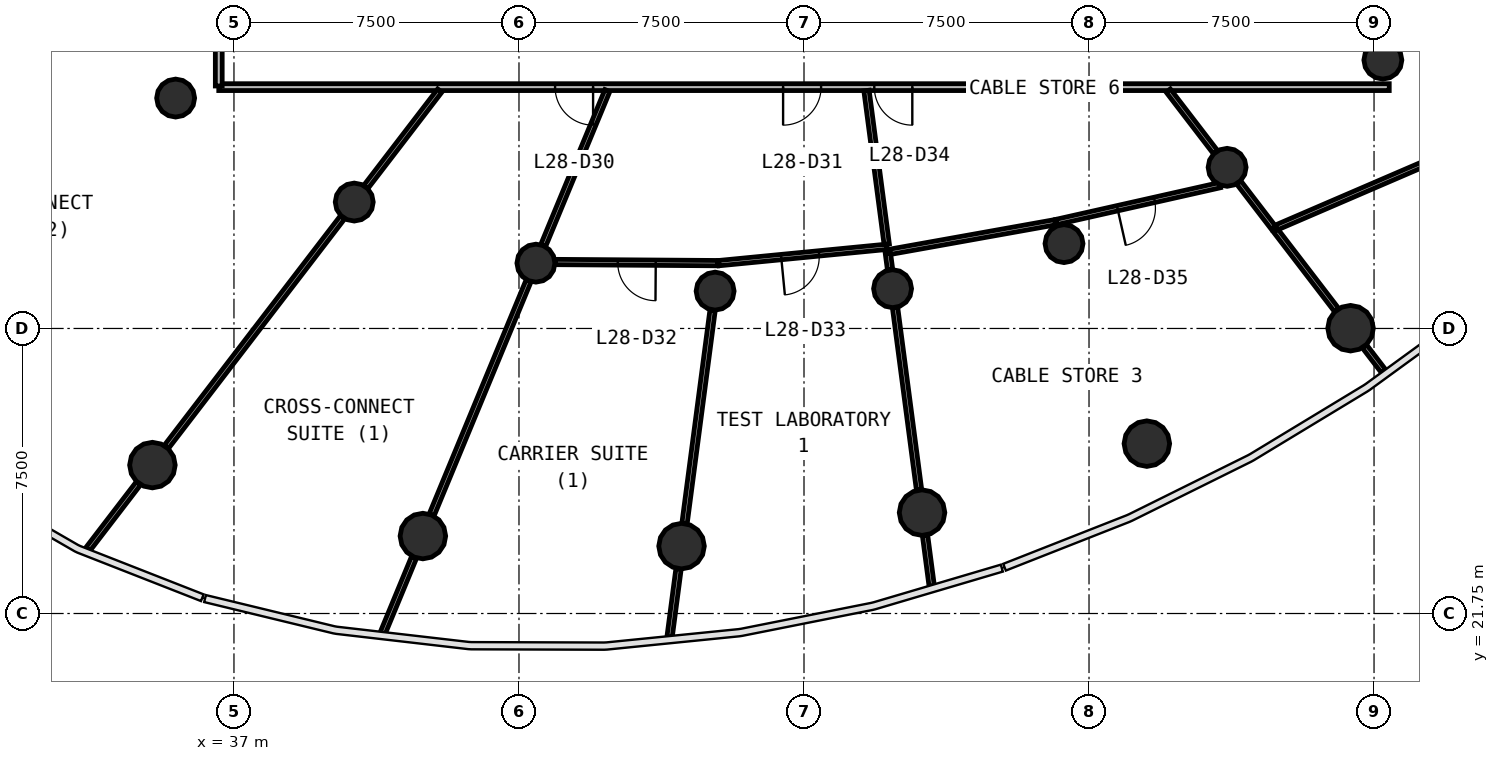
"""IFC4 building model, lengths in metres.
Left out: names, types, materials, properties, quantities, classifications, styles, units other than length and angle.
Written with IfcOpenShell. Run it as: python <this file> out.ifc"""

import sys

from ifc_helpers import new_model, si_unit, direction, frame, frame_2d, origin, origin_2d, place, context, subcontext, project, spatial, rectangle, circle, extrude, source, transform, mapped, element, fill, save


model = new_model("IFC4")
c1 = context("Model", 3, precision=1e-05, world=origin(), true_north=direction((0.0, 1.0)))
c2 = subcontext(c1, "Body", "Model", "MODEL_VIEW")
j1 = project(units=[si_unit("LENGTHUNIT", "METRE"), si_unit("PLANEANGLEUNIT", "RADIAN")], contexts=[c1])
p1 = place(None, origin())
s1 = spatial("IfcSite", under=j1, at=p1, CompositionType="ELEMENT")
p2 = place(p1, origin())
s2 = spatial("IfcBuilding", under=s1, at=p2, CompositionType="ELEMENT")
p3 = place(p2, frame((0.0, 0.0, 120.8)))
s3 = spatial("IfcBuildingStorey", under=s2, at=p3, CompositionType="ELEMENT", Elevation=120.8)
m1 = source(origin(), c2, "Body", "SweptSolid", [
    extrude(circle(Radius=0.6, at=origin_2d()), origin(), (0.0, 0.0, 1.0), 4.1),
])
for number, where, z_axis, x_axis in (
    (1, (34.854, 25.655, 0.0), (0.0, 0.0, 1.0), (1.0, 0.0, 0.0)),
    (2, (41.971, 23.788, 0.0), (0.0, 0.0, 1.0), (1.0, 0.0, 0.0)),
    (3, (48.778, 23.523, 0.0), (0.0, 0.0, 1.0), (1.0, 0.0, 0.0)),
    (4, (55.106, 24.405, 0.0), (0.0, 0.0, 1.0), (1.0, 0.0, 0.0)),
    (5, (61.022, 26.219, 0.0), (0.0, 0.0, 1.0), (1.0, 0.0, 0.0)),
    (6, (66.382, 29.257, 0.0), (0.0, 0.0, 1.0), (1.0, 0.0, 0.0)),
):
    element("IfcColumn", number, at=place(p3, frame(where, z_axis=z_axis, x_axis=x_axis)), inside=s3, PredefinedType="COLUMN", context=c2, shape_type="MappedRepresentation", body=[
        mapped(m1, transform((0.0, 0.0, 0.0), scale=1.0)),
    ])
m2 = source(origin(), c2, "Body", "SweptSolid", [
    extrude(circle(Radius=0.5, at=origin_2d()), origin(), (0.0, 0.0, 1.0), 4.1),
])
for number, where, z_axis, x_axis in (
    (7, (35.465, 35.312, 0.0), (0.0, 0.0, 1.0), (1.0, 0.0, 0.0)),
    (8, (40.165, 32.576, 0.0), (0.0, 0.0, 1.0), (1.0, 0.0, 0.0)),
    (9, (44.945, 30.969, 0.0), (0.0, 0.0, 1.0), (1.0, 0.0, 0.0)),
    (10, (49.661, 30.233, 0.0), (0.0, 0.0, 1.0), (1.0, 0.0, 0.0)),
    (11, (54.331, 30.297, 0.0), (0.0, 0.0, 1.0), (1.0, 0.0, 0.0)),
    (12, (58.842, 31.482, 0.0), (0.0, 0.0, 1.0), (1.0, 0.0, 0.0)),
    (13, (63.134, 33.49, 0.0), (0.0, 0.0, 1.0), (1.0, 0.0, 0.0)),
    (14, (67.232, 36.312, 0.0), (0.0, 0.0, 1.0), (1.0, 0.0, 0.0)),
):
    element("IfcColumn", number, at=place(p3, frame(where, z_axis=z_axis, x_axis=x_axis)), inside=s3, PredefinedType="COLUMN", context=c2, shape_type="MappedRepresentation", body=[
        mapped(m2, transform((0.0, 0.0, 0.0), scale=1.0)),
    ])
p4 = place(p3, frame((67.4, 35.6, 0.0), z_axis=(0.0, 0.0, 1.0), x_axis=(-1.0, 0.0, 0.0)))
e15 = element("IfcWall", 15, at=p4, inside=s3, PredefinedType="PARTITIONING", context=c2, shape_type="SweptSolid", body=[
    extrude(rectangle(XDim=30.8, YDim=0.18, at=frame_2d((15.4, 0.0))), origin(), (0.0, 0.0, 1.0), 2.9),
])
p5 = place(p4, frame((20.95, 0.0, 0.0)))
e16 = element("IfcOpeningElement", 16, at=p5, cuts=e15, PredefinedType="OPENING", context=c2, shape_type="SweptSolid", body=[
    extrude(rectangle(XDim=1.0, YDim=2.1, at=frame_2d((0.5, 1.05))), frame((0.0, 0.1, 0.0), z_axis=(0.0, -1.0, 0.0), x_axis=(1.0, 0.0, 0.0)), (0.0, 0.0, 1.0), 0.2),
])
p6 = place(p4, frame((14.95, 0.0, 0.0)))
e17 = element("IfcOpeningElement", 17, at=p6, cuts=e15, PredefinedType="OPENING", context=c2, shape_type="SweptSolid", body=[
    extrude(rectangle(XDim=1.0, YDim=2.1, at=frame_2d((0.5, 1.05))), frame((0.0, 0.1, 0.0), z_axis=(0.0, -1.0, 0.0), x_axis=(1.0, 0.0, 0.0)), (0.0, 0.0, 1.0), 0.2),
])
p7 = place(p4, frame((12.55, 0.0, 0.0)))
e18 = element("IfcOpeningElement", 18, at=p7, cuts=e15, PredefinedType="OPENING", context=c2, shape_type="SweptSolid", body=[
    extrude(rectangle(XDim=1.0, YDim=2.1, at=frame_2d((0.5, 1.05))), frame((0.0, 0.1, 0.0), z_axis=(0.0, -1.0, 0.0), x_axis=(1.0, 0.0, 0.0)), (0.0, 0.0, 1.0), 0.2),
])
p8 = place(p3, frame((36.6, 35.63, 0.0), z_axis=(0.0, 0.0, 1.0), x_axis=(0.0, 1.0, 0.0)))
e19 = element("IfcWall", 19, at=p8, inside=s3, PredefinedType="PARTITIONING", context=c2, shape_type="SweptSolid", body=[
    extrude(rectangle(XDim=23.583, YDim=0.18, at=frame_2d((11.791, 0.0))), origin(), (0.0, 0.0, 1.0), 2.9),
])
p9 = place(p8, frame((11.333, 0.0, 0.0)))
e20 = element("IfcOpeningElement", 20, at=p9, cuts=e19, PredefinedType="OPENING", context=c2, shape_type="SweptSolid", body=[
    extrude(rectangle(XDim=1.0, YDim=2.1, at=frame_2d((0.5, 1.05))), frame((0.0, 0.1, 0.0), z_axis=(0.0, -1.0, 0.0), x_axis=(1.0, 0.0, 0.0)), (0.0, 0.0, 1.0), 0.2),
])
p10 = place(p8, frame((4.532, 0.0, 0.0)))
e21 = element("IfcOpeningElement", 21, at=p10, cuts=e19, PredefinedType="OPENING", context=c2, shape_type="SweptSolid", body=[
    extrude(rectangle(XDim=1.0, YDim=2.1, at=frame_2d((0.5, 1.05))), frame((0.0, 0.1, 0.0), z_axis=(0.0, -1.0, 0.0), x_axis=(1.0, 0.0, 0.0)), (0.0, 0.0, 1.0), 0.2),
])
p11 = place(p3, frame((39.858, 32.176, 0.0), z_axis=(0.0, 0.0, 1.0), x_axis=(-0.608755907151, -0.793357577331, 0.0)))
e22 = element("IfcWall", 22, at=p11, inside=s3, PredefinedType="PARTITIONING", context=c2, shape_type="SweptSolid", body=[
    extrude(rectangle(XDim=7.615, YDim=0.14, at=frame_2d((3.808, 0.0))), origin(), (0.0, 0.0, 1.0), 2.9),
])
p12 = place(p3, frame((44.752, 30.502, 0.0), z_axis=(0.0, 0.0, 1.0), x_axis=(-0.382696989205, -0.923873916968, 0.0)))
e23 = element("IfcWall", 23, at=p12, inside=s3, PredefinedType="PARTITIONING", context=c2, shape_type="SweptSolid", body=[
    extrude(rectangle(XDim=6.663, YDim=0.14, at=frame_2d((3.332, 0.0))), origin(), (0.0, 0.0, 1.0), 2.9),
])
p13 = place(p3, frame((64.369, 31.88, 0.0), z_axis=(0.0, 0.0, 1.0), x_axis=(0.918435041442, 0.395571832481, 0.0)))
e24 = element("IfcWall", 24, at=p13, inside=s3, PredefinedType="PARTITIONING", context=c2, shape_type="SweptSolid", body=[
    extrude(rectangle(XDim=6.024, YDim=0.14, at=frame_2d((3.012, 0.0))), origin(), (0.0, 0.0, 1.0), 2.9),
])
p14 = place(p3, frame((49.595, 29.733, 0.0), z_axis=(0.0, 0.0, 1.0), x_axis=(-0.130510314557, -0.991446951578, 0.0)))
e25 = element("IfcWall", 25, at=p14, inside=s3, PredefinedType="PARTITIONING", context=c2, shape_type="SweptSolid", body=[
    extrude(rectangle(XDim=5.659, YDim=0.14, at=frame_2d((2.829, 0.0))), origin(), (0.0, 0.0, 1.0), 2.9),
])
p15 = place(p3, frame((54.396, 29.797, 0.0), z_axis=(0.0, 0.0, 1.0), x_axis=(0.130552494248, -0.991441398291, 0.0)))
e26 = element("IfcWall", 26, at=p15, inside=s3, PredefinedType="PARTITIONING", context=c2, shape_type="SweptSolid", body=[
    extrude(rectangle(XDim=4.834, YDim=0.14, at=frame_2d((2.417, 0.0))), origin(), (0.0, 0.0, 1.0), 2.9),
])
p16 = place(p3, frame((46.826, 35.51, 0.0), z_axis=(0.0, 0.0, 1.0), x_axis=(-0.382672831764, -0.923883923353, 0.0)))
e27 = element("IfcWall", 27, at=p16, inside=s3, PredefinedType="PARTITIONING", context=c2, shape_type="SweptSolid", body=[
    extrude(rectangle(XDim=4.41, YDim=0.14, at=frame_2d((2.205, 0.0))), origin(), (0.0, 0.0, 1.0), 2.9),
])
p17 = place(p3, frame((54.204, 31.256, 0.0), z_axis=(0.0, 0.0, 1.0), x_axis=(0.984348229454, 0.176234398378, 0.0)))
e28 = element("IfcWall", 28, at=p17, inside=s3, PredefinedType="PARTITIONING", context=c2, shape_type="SweptSolid", body=[
    extrude(rectangle(XDim=4.475, YDim=0.14, at=frame_2d((2.237, 0.0))), origin(), (0.0, 0.0, 1.0), 2.9),
])
p18 = place(p3, frame((54.186, 31.399, 0.0), z_axis=(0.0, 0.0, 1.0), x_axis=(-0.995308336276, -0.096753892636, 0.0)))
e29 = element("IfcWall", 29, at=p18, inside=s3, PredefinedType="PARTITIONING", context=c2, shape_type="SweptSolid", body=[
    extrude(rectangle(XDim=4.448, YDim=0.14, at=frame_2d((2.224, 0.0))), origin(), (0.0, 0.0, 1.0), 2.9),
])
p19 = place(p18, frame((1.799, 0.0, 0.0)))
e30 = element("IfcOpeningElement", 30, at=p19, cuts=e29, PredefinedType="OPENING", context=c2, shape_type="SweptSolid", body=[
    extrude(rectangle(XDim=1.0, YDim=2.1, at=frame_2d((0.5, 1.05))), frame((0.0, 0.08, 0.0), z_axis=(0.0, -1.0, 0.0), x_axis=(1.0, 0.0, 0.0)), (0.0, 0.0, 1.0), 0.16),
])
p20 = place(p3, frame((62.946, 33.021, 0.0), z_axis=(0.0, 0.0, 1.0), x_axis=(-0.975566521818, -0.219704259192, 0.0)))
e31 = element("IfcWall", 31, at=p20, inside=s3, PredefinedType="PARTITIONING", context=c2, shape_type="SweptSolid", body=[
    extrude(rectangle(XDim=4.416, YDim=0.14, at=frame_2d((2.208, 0.0))), origin(), (0.0, 0.0, 1.0), 2.9),
])
p21 = place(p20, frame((1.766, 0.0, 0.0)))
e32 = element("IfcOpeningElement", 32, at=p21, cuts=e31, PredefinedType="OPENING", context=c2, shape_type="SweptSolid", body=[
    extrude(rectangle(XDim=1.0, YDim=2.1, at=frame_2d((0.5, 1.05))), frame((0.0, 0.08, 0.0), z_axis=(0.0, -1.0, 0.0), x_axis=(1.0, 0.0, 0.0)), (0.0, 0.0, 1.0), 0.16),
])
p22 = place(p3, frame((49.728, 30.969, 0.0), z_axis=(0.0, 0.0, 1.0), x_axis=(-0.999976168049, 0.006903863764, 0.0)))
e33 = element("IfcWall", 33, at=p22, inside=s3, PredefinedType="PARTITIONING", context=c2, shape_type="SweptSolid", body=[
    extrude(rectangle(XDim=4.279, YDim=0.14, at=frame_2d((2.139, 0.0))), origin(), (0.0, 0.0, 1.0), 2.9),
])
p23 = place(p22, frame((1.629, 0.0, 0.0)))
e34 = element("IfcOpeningElement", 34, at=p23, cuts=e33, PredefinedType="OPENING", context=c2, shape_type="SweptSolid", body=[
    extrude(rectangle(XDim=1.0, YDim=2.1, at=frame_2d((0.5, 1.05))), frame((0.0, 0.08, 0.0), z_axis=(0.0, -1.0, 0.0), x_axis=(1.0, 0.0, 0.0)), (0.0, 0.0, 1.0), 0.16),
])
p24 = place(p3, frame((53.644, 35.51, 0.0), z_axis=(0.0, 0.0, 1.0), x_axis=(0.130570713339, -0.99143899904, 0.0)))
e35 = element("IfcWall", 35, at=p24, inside=s3, PredefinedType="PARTITIONING", context=c2, shape_type="SweptSolid", body=[
    extrude(rectangle(XDim=4.076, YDim=0.14, at=frame_2d((2.038, 0.0))), origin(), (0.0, 0.0, 1.0), 2.9),
])
p25 = place(p3, frame((42.416, 35.51, 0.0), z_axis=(0.0, 0.0, 1.0), x_axis=(-0.60874605662, -0.793365135703, 0.0)))
e36 = element("IfcWall", 36, at=p25, inside=s3, PredefinedType="PARTITIONING", context=c2, shape_type="SweptSolid", body=[
    extrude(rectangle(XDim=3.194, YDim=0.14, at=frame_2d((1.597, 0.0))), origin(), (0.0, 0.0, 1.0), 2.9),
])
p26 = place(p3, frame((64.413, 31.823, 0.0), z_axis=(0.0, 0.0, 1.0), x_axis=(0.608786176841, -0.793334349998, 0.0)))
e37 = element("IfcWall", 37, at=p26, inside=s3, PredefinedType="PARTITIONING", context=c2, shape_type="SweptSolid", body=[
    extrude(rectangle(XDim=2.63, YDim=0.14, at=frame_2d((1.315, 0.0))), origin(), (0.0, 0.0, 1.0), 2.9),
])
p27 = place(p3, frame((34.486, 25.176, 0.0), z_axis=(0.0, 0.0, 1.0), x_axis=(-0.608790940556, -0.793330694412, 0.0)))
e38 = element("IfcWall", 38, at=p27, inside=s3, PredefinedType="PARTITIONING", context=c2, shape_type="SweptSolid", body=[
    extrude(rectangle(XDim=2.182, YDim=0.14, at=frame_2d((1.091, 0.0))), origin(), (0.0, 0.0, 1.0), 2.9),
])
p28 = place(p3, frame((41.74, 23.229, 0.0), z_axis=(0.0, 0.0, 1.0), x_axis=(-0.38271416586, -0.923866801682, 0.0)))
e39 = element("IfcWall", 39, at=p28, inside=s3, PredefinedType="PARTITIONING", context=c2, shape_type="SweptSolid", body=[
    extrude(rectangle(XDim=2.162, YDim=0.14, at=frame_2d((1.081, 0.0))), origin(), (0.0, 0.0, 1.0), 2.9),
])
p29 = place(p3, frame((61.584, 35.51, 0.0), z_axis=(0.0, 0.0, 1.0), x_axis=(0.608727763541, -0.793379171578, 0.0)))
e40 = element("IfcWall", 40, at=p29, inside=s3, PredefinedType="PARTITIONING", context=c2, shape_type="SweptSolid", body=[
    extrude(rectangle(XDim=2.042, YDim=0.14, at=frame_2d((1.021, 0.0))), origin(), (0.0, 0.0, 1.0), 2.9),
])
p30 = place(p3, frame((48.699, 22.924, 0.0), z_axis=(0.0, 0.0, 1.0), x_axis=(-0.13060094235, -0.991435017466, 0.0)))
e41 = element("IfcWall", 41, at=p30, inside=s3, PredefinedType="PARTITIONING", context=c2, shape_type="SweptSolid", body=[
    extrude(rectangle(XDim=1.812, YDim=0.14, at=frame_2d((0.906, 0.0))), origin(), (0.0, 0.0, 1.0), 2.9),
])
p31 = place(p3, frame((63.441, 33.09, 0.0), z_axis=(0.0, 0.0, 1.0), x_axis=(0.608692090741, -0.793406540601, 0.0)))
e42 = element("IfcWall", 42, at=p31, inside=s3, PredefinedType="PARTITIONING", context=c2, shape_type="SweptSolid", body=[
    extrude(rectangle(XDim=1.495, YDim=0.14, at=frame_2d((0.748, 0.0))), origin(), (0.0, 0.0, 1.0), 2.9),
])
p32 = place(p3, frame((55.185, 23.805, 0.0), z_axis=(0.0, 0.0, 1.0), x_axis=(0.130426318704, -0.991458004854, 0.0)))
e43 = element("IfcWall", 43, at=p32, inside=s3, PredefinedType="PARTITIONING", context=c2, shape_type="SweptSolid", body=[
    extrude(rectangle(XDim=1.344, YDim=0.14, at=frame_2d((0.672, 0.0))), origin(), (0.0, 0.0, 1.0), 2.9),
])
p33 = place(p3, frame((66.75, 28.778, 0.0), z_axis=(0.0, 0.0, 1.0), x_axis=(0.608749278859, -0.793362663281, 0.0)))
e44 = element("IfcWall", 44, at=p33, inside=s3, PredefinedType="PARTITIONING", context=c2, shape_type="SweptSolid", body=[
    extrude(rectangle(XDim=0.823, YDim=0.14, at=frame_2d((0.411, 0.0))), origin(), (0.0, 0.0, 1.0), 2.9),
])
p34 = place(p3, frame((54.208, 31.227, 0.0), z_axis=(0.0, 0.0, 1.0), x_axis=(0.130614709422, -0.991433203843, 0.0)))
e45 = element("IfcWall", 45, at=p34, inside=s3, PredefinedType="PARTITIONING", context=c2, shape_type="SweptSolid", body=[
    extrude(rectangle(XDim=0.434, YDim=0.14, at=frame_2d((0.217, 0.0))), origin(), (0.0, 0.0, 1.0), 2.9),
])
m3 = source(origin(), c2, "Body", "SweptSolid", [
    extrude(rectangle(XDim=1.0, YDim=2.1, at=frame_2d((0.5, 1.05))), frame((0.0, 0.025, 0.0), z_axis=(0.0, -1.0, 0.0), x_axis=(1.0, 0.0, 0.0)), (0.0, 0.0, 1.0), 0.05),
])
p35 = place(p5, origin())
e46 = element("IfcDoor", 46, at=p35, inside=s3, OperationType="SINGLE_SWING_LEFT", PredefinedType="DOOR", context=c2, shape_type="MappedRepresentation", body=[
    mapped(m3, transform((0.0, 0.0, 0.0), scale=1.0)),
])
fill(e16, e46)
p36 = place(p6, origin())
e47 = element("IfcDoor", 47, at=p36, inside=s3, OperationType="SINGLE_SWING_RIGHT", PredefinedType="DOOR", context=c2, shape_type="MappedRepresentation", body=[
    mapped(m3, transform((0.0, 0.0, 0.0), scale=1.0)),
])
fill(e17, e47)
p37 = place(p23, origin())
e48 = element("IfcDoor", 48, at=p37, inside=s3, OperationType="SINGLE_SWING_LEFT", PredefinedType="DOOR", context=c2, shape_type="MappedRepresentation", body=[
    mapped(m3, transform((0.0, 0.0, 0.0), scale=1.0)),
])
fill(e34, e48)
p38 = place(p19, origin())
e49 = element("IfcDoor", 49, at=p38, inside=s3, OperationType="SINGLE_SWING_RIGHT", PredefinedType="DOOR", context=c2, shape_type="MappedRepresentation", body=[
    mapped(m3, transform((0.0, 0.0, 0.0), scale=1.0)),
])
fill(e30, e49)
p39 = place(p7, origin())
e50 = element("IfcDoor", 50, at=p39, inside=s3, OperationType="SINGLE_SWING_LEFT", PredefinedType="DOOR", context=c2, shape_type="MappedRepresentation", body=[
    mapped(m3, transform((0.0, 0.0, 0.0), scale=1.0)),
])
fill(e18, e50)
p40 = place(p21, origin())
e51 = element("IfcDoor", 51, at=p40, inside=s3, OperationType="SINGLE_SWING_RIGHT", PredefinedType="DOOR", context=c2, shape_type="MappedRepresentation", body=[
    mapped(m3, transform((0.0, 0.0, 0.0), scale=1.0)),
])
fill(e32, e51)
save(model, sys.argv[1])
